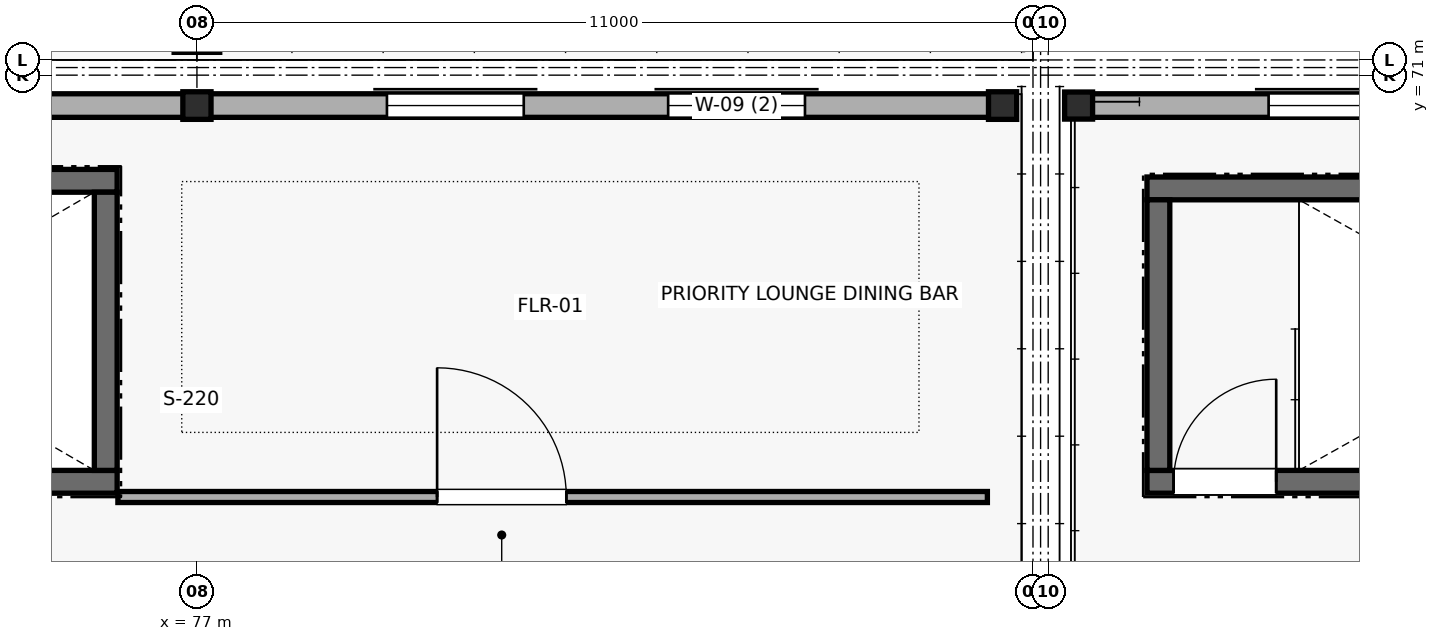
"""IFC4 building model, lengths in metres.
Left out: names, types, materials, properties, quantities, classifications, styles, units other than length and angle.
Written with IfcOpenShell. Run it as: python <this file> out.ifc"""

import sys

from ifc_helpers import new_model, si_unit, direction, frame, frame_2d, origin, origin_2d, place, context, subcontext, project, spatial, rectangle, i_section, extrude, element, fill, save


model = new_model("IFC4")
c1 = context("Model", 3, precision=1e-05, world=origin(), true_north=direction((0.0, 1.0)))
c2 = subcontext(c1, "Body", "Model", "MODEL_VIEW")
j1 = project(units=[si_unit("LENGTHUNIT", "METRE"), si_unit("PLANEANGLEUNIT", "RADIAN")], contexts=[c1])
p1 = place(None, origin())
s1 = spatial("IfcSite", under=j1, at=p1, CompositionType="ELEMENT")
p2 = place(p1, origin())
s2 = spatial("IfcBuilding", under=s1, at=p2, CompositionType="ELEMENT")
p3 = place(p2, frame((0.0, 0.0, 9.9)))
s3 = spatial("IfcBuildingStorey", under=s2, at=p3, CompositionType="ELEMENT", Elevation=9.9)
for number, where, z_axis, x_axis in (
    (1, (77.0, 70.6, 0.0), (0.0, 0.0, 1.0), (1.0, 0.0, 0.0)),
    (2, (87.6, 70.6, 0.0), (0.0, 0.0, 1.0), (1.0, 0.0, 0.0)),
):
    element("IfcColumn", number, at=place(p3, frame(where, z_axis=z_axis, x_axis=x_axis)), inside=s3, PredefinedType="COLUMN", context=c2, shape_type="SweptSolid", body=[
        extrude(i_section(OverallWidth=0.371, OverallDepth=0.363, WebThickness=0.013, FlangeThickness=0.022, FilletRadius=0.018, at=origin_2d()), origin(), (0.0, 0.0, 1.0), 4.2),
    ])
p4 = place(p3, frame((88.6, 70.6, 0.0), z_axis=(0.0, 0.0, 1.0), x_axis=(1.0, 0.0, 0.0)))
e3 = element("IfcColumn", 3, at=p4, inside=s3, PredefinedType="COLUMN", context=c2, shape_type="SweptSolid", body=[
    extrude(i_section(OverallWidth=0.368, OverallDepth=0.356, WebThickness=0.011, FlangeThickness=0.018, at=origin_2d()), origin(), (0.0, 0.0, 1.0), 4.2),
])
p5 = place(p3, frame((76.995, 70.6, 0.0), z_axis=(0.0, 0.0, 1.0), x_axis=(-1.0, 0.0, 0.0)))
e4 = element("IfcWall", 4, at=p5, inside=s3, PredefinedType="SOLIDWALL", context=c2, shape_type="SweptSolid", body=[
    extrude(rectangle(XDim=10.991, YDim=0.31, at=frame_2d((5.495, 0.0))), origin(), (0.0, 0.0, 1.0), 3.302),
])
p6 = place(p5, frame((2.595, 0.0, 1.05)))
e5 = element("IfcOpeningElement", 5, at=p6, cuts=e4, PredefinedType="OPENING", context=c2, shape_type="SweptSolid", body=[
    extrude(rectangle(XDim=1.8, YDim=1.8, at=frame_2d((0.9, 0.9))), frame((0.0, 0.165, 0.0), z_axis=(0.0, -1.0, 0.0), x_axis=(1.0, 0.0, 0.0)), (0.0, 0.0, 1.0), 0.33),
])
p7 = place(p5, frame((6.295, 0.0, 1.05)))
e6 = element("IfcOpeningElement", 6, at=p7, cuts=e4, PredefinedType="OPENING", context=c2, shape_type="SweptSolid", body=[
    extrude(rectangle(XDim=1.8, YDim=1.8, at=frame_2d((0.9, 0.9))), frame((0.0, 0.165, 0.0), z_axis=(0.0, -1.0, 0.0), x_axis=(1.0, 0.0, 0.0)), (0.0, 0.0, 1.0), 0.33),
])
p8 = place(p3, frame((87.595, 70.6, 0.0), z_axis=(0.0, 0.0, 1.0), x_axis=(-1.0, 0.0, 0.0)))
e7 = element("IfcWall", 7, at=p8, inside=s3, PredefinedType="SOLIDWALL", context=c2, shape_type="SweptSolid", body=[
    extrude(rectangle(XDim=10.591, YDim=0.31, at=frame_2d((5.295, 0.0))), origin(), (0.0, 0.0, 1.0), 3.302),
])
p9 = place(p8, frame((2.595, 0.0, 1.05)))
e8 = element("IfcOpeningElement", 8, at=p9, cuts=e7, PredefinedType="OPENING", context=c2, shape_type="SweptSolid", body=[
    extrude(rectangle(XDim=1.8, YDim=1.8, at=frame_2d((0.9, 0.9))), frame((0.0, 0.165, 0.0), z_axis=(0.0, -1.0, 0.0), x_axis=(1.0, 0.0, 0.0)), (0.0, 0.0, 1.0), 0.33),
])
p10 = place(p8, frame((6.295, 0.0, 1.05)))
e9 = element("IfcOpeningElement", 9, at=p10, cuts=e7, PredefinedType="OPENING", context=c2, shape_type="SweptSolid", body=[
    extrude(rectangle(XDim=1.8, YDim=1.8, at=frame_2d((0.9, 0.9))), frame((0.0, 0.165, 0.0), z_axis=(0.0, -1.0, 0.0), x_axis=(1.0, 0.0, 0.0)), (0.0, 0.0, 1.0), 0.33),
])
p11 = place(p3, frame((99.196, 70.6, 0.0), z_axis=(0.0, 0.0, 1.0), x_axis=(-1.0, 0.0, 0.0)))
e10 = element("IfcWall", 10, at=p11, inside=s3, PredefinedType="SOLIDWALL", context=c2, shape_type="SweptSolid", body=[
    extrude(rectangle(XDim=10.593, YDim=0.31, at=frame_2d((5.296, 0.0))), origin(), (0.0, 0.0, 1.0), 3.302),
])
p12 = place(p11, frame((2.596, 0.0, 1.05)))
e11 = element("IfcOpeningElement", 11, at=p12, cuts=e10, PredefinedType="OPENING", context=c2, shape_type="SweptSolid", body=[
    extrude(rectangle(XDim=1.8, YDim=1.8, at=frame_2d((0.9, 0.9))), frame((0.0, 0.165, 0.0), z_axis=(0.0, -1.0, 0.0), x_axis=(1.0, 0.0, 0.0)), (0.0, 0.0, 1.0), 0.33),
])
p13 = place(p11, frame((6.296, 0.0, 1.05)))
e12 = element("IfcOpeningElement", 12, at=p13, cuts=e10, PredefinedType="OPENING", context=c2, shape_type="SweptSolid", body=[
    extrude(rectangle(XDim=1.8, YDim=1.8, at=frame_2d((0.9, 0.9))), frame((0.0, 0.165, 0.0), z_axis=(0.0, -1.0, 0.0), x_axis=(1.0, 0.0, 0.0)), (0.0, 0.0, 1.0), 0.33),
])
p14 = place(p3, frame((67.3, 65.65, 0.0), z_axis=(0.0, 0.0, 1.0), x_axis=(1.0, 0.0, 0.0)))
e13 = element("IfcWall", 13, at=p14, inside=s3, PredefinedType="SHEAR", context=c2, shape_type="SweptSolid", body=[
    extrude(rectangle(XDim=8.65, YDim=0.3, at=frame_2d((4.325, 0.0))), origin(), (0.0, 0.0, 1.0), 3.99),
])
p15 = place(p14, frame((0.35, 0.0, 0.0)))
e14 = element("IfcOpeningElement", 14, at=p15, cuts=e13, PredefinedType="OPENING", context=c2, shape_type="SweptSolid", body=[
    extrude(rectangle(XDim=1.35, YDim=2.2, at=frame_2d((0.675, 1.1))), frame((0.0, 0.16, 0.0), z_axis=(0.0, -1.0, 0.0), x_axis=(1.0, 0.0, 0.0)), (0.0, 0.0, 1.0), 0.32),
])
p16 = place(p3, frame((75.95, 69.61, 0.0), z_axis=(0.0, 0.0, 1.0), x_axis=(-1.0, 0.0, 0.0)))
e15 = element("IfcWall", 15, at=p16, inside=s3, PredefinedType="SHEAR", context=c2, shape_type="SweptSolid", body=[
    extrude(rectangle(XDim=8.65, YDim=0.3, at=frame_2d((4.325, 0.0))), origin(), (0.0, 0.0, 1.0), 3.99),
])
p17 = place(p3, frame((75.8, 65.8, 0.0), z_axis=(0.0, 0.0, 1.0), x_axis=(0.0, 1.0, 0.0)))
e16 = element("IfcWall", 16, at=p17, inside=s3, PredefinedType="SHEAR", context=c2, shape_type="SweptSolid", body=[
    extrude(rectangle(XDim=3.66, YDim=0.3, at=frame_2d((1.83, 0.0))), origin(), (0.0, 0.0, 1.0), 3.99),
])
p18 = place(p3, frame((89.5, 65.65, 0.0), z_axis=(0.0, 0.0, 1.0), x_axis=(1.0, 0.0, 0.0)))
e17 = element("IfcWall", 17, at=p18, inside=s3, PredefinedType="SHEAR", context=c2, shape_type="SweptSolid", body=[
    extrude(rectangle(XDim=8.65, YDim=0.3, at=frame_2d((4.325, 0.0))), origin(), (0.0, 0.0, 1.0), 3.99),
])
p19 = place(p18, frame((0.35, 0.0, 0.0)))
e18 = element("IfcOpeningElement", 18, at=p19, cuts=e17, PredefinedType="OPENING", context=c2, shape_type="SweptSolid", body=[
    extrude(rectangle(XDim=1.35, YDim=2.2, at=frame_2d((0.675, 1.1))), frame((0.0, 0.16, 0.0), z_axis=(0.0, -1.0, 0.0), x_axis=(1.0, 0.0, 0.0)), (0.0, 0.0, 1.0), 0.32),
])
p20 = place(p3, frame((98.15, 69.51, 0.0), z_axis=(0.0, 0.0, 1.0), x_axis=(-1.0, 0.0, 0.0)))
e19 = element("IfcWall", 19, at=p20, inside=s3, PredefinedType="SHEAR", context=c2, shape_type="SweptSolid", body=[
    extrude(rectangle(XDim=8.65, YDim=0.3, at=frame_2d((4.325, 0.0))), origin(), (0.0, 0.0, 1.0), 3.99),
])
p21 = place(p3, frame((89.65, 69.36, 0.0), z_axis=(0.0, 0.0, 1.0), x_axis=(0.0, -1.0, 0.0)))
e20 = element("IfcWall", 20, at=p21, inside=s3, PredefinedType="SHEAR", context=c2, shape_type="SweptSolid", body=[
    extrude(rectangle(XDim=3.56, YDim=0.3, at=frame_2d((1.78, 0.0))), origin(), (0.0, 0.0, 1.0), 3.99),
])
p22 = place(p3, frame((75.96, 65.45, 0.0), z_axis=(0.0, 0.0, 1.0), x_axis=(1.0, 0.0, 0.0)))
e21 = element("IfcWall", 21, at=p22, inside=s3, PredefinedType="PARTITIONING", context=c2, shape_type="SweptSolid", body=[
    extrude(rectangle(XDim=11.44, YDim=0.145, at=frame_2d((5.72, 0.0))), origin(), (0.0, 0.0, 1.0), 3.99),
])
p23 = place(p22, frame((4.2, 0.0, 0.0)))
e22 = element("IfcOpeningElement", 22, at=p23, cuts=e21, PredefinedType="OPENING", context=c2, shape_type="SweptSolid", body=[
    extrude(rectangle(XDim=1.7, YDim=2.35, at=frame_2d((0.85, 1.175))), frame((0.0, 0.083, 0.0), z_axis=(0.0, -1.0, 0.0), x_axis=(1.0, 0.0, 0.0)), (0.0, 0.0, 1.0), 0.165),
])
p24 = place(p9, origin())
e23 = element("IfcWindow", 23, at=p24, inside=s3, PartitioningType="SINGLE_PANEL", PredefinedType="WINDOW", context=c2, shape_type="SweptSolid", body=[
    extrude(rectangle(XDim=1.8, YDim=1.8, at=frame_2d((0.9, 0.9))), frame((0.0, 0.03, 0.0), z_axis=(0.0, -1.0, 0.0), x_axis=(1.0, 0.0, 0.0)), (0.0, 0.0, 1.0), 0.06),
])
fill(e8, e23)
p25 = place(p10, origin())
e24 = element("IfcWindow", 24, at=p25, inside=s3, PartitioningType="SINGLE_PANEL", PredefinedType="WINDOW", context=c2, shape_type="SweptSolid", body=[
    extrude(rectangle(XDim=1.8, YDim=1.8, at=frame_2d((0.9, 0.9))), frame((0.0, 0.03, 0.0), z_axis=(0.0, -1.0, 0.0), x_axis=(1.0, 0.0, 0.0)), (0.0, 0.0, 1.0), 0.06),
])
fill(e9, e24)
p26 = place(p13, origin())
e25 = element("IfcWindow", 25, at=p26, inside=s3, PartitioningType="SINGLE_PANEL", PredefinedType="WINDOW", context=c2, shape_type="SweptSolid", body=[
    extrude(rectangle(XDim=1.8, YDim=1.8, at=frame_2d((0.9, 0.9))), frame((0.0, 0.03, 0.0), z_axis=(0.0, -1.0, 0.0), x_axis=(1.0, 0.0, 0.0)), (0.0, 0.0, 1.0), 0.06),
])
fill(e12, e25)
p27 = place(p19, origin())
e26 = element("IfcDoor", 26, at=p27, inside=s3, OperationType="SINGLE_SWING_RIGHT", PredefinedType="DOOR", context=c2, shape_type="SweptSolid", body=[
    extrude(rectangle(XDim=1.35, YDim=2.2, at=frame_2d((0.675, 1.1))), frame((0.0, 0.025, 0.0), z_axis=(0.0, -1.0, 0.0), x_axis=(1.0, 0.0, 0.0)), (0.0, 0.0, 1.0), 0.05),
])
fill(e18, e26)
p28 = place(p23, origin())
e27 = element("IfcDoor", 27, at=p28, inside=s3, OperationType="SINGLE_SWING_LEFT", PredefinedType="DOOR", context=c2, shape_type="SweptSolid", body=[
    extrude(rectangle(XDim=1.7, YDim=2.35, at=frame_2d((0.85, 1.175))), frame((0.0, 0.025, 0.0), z_axis=(0.0, -1.0, 0.0), x_axis=(1.0, 0.0, 0.0)), (0.0, 0.0, 1.0), 0.05),
])
fill(e22, e27)
save(model, sys.argv[1])
